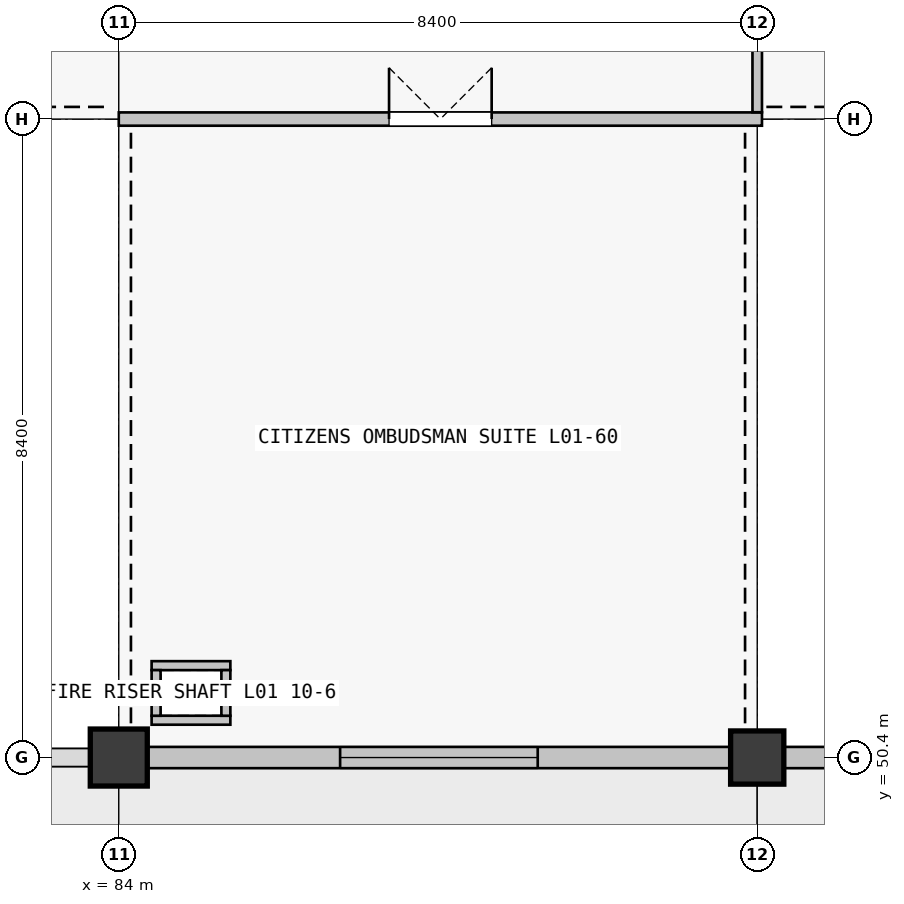
"""IFC4 building model, lengths in metres.
Left out: names, types, materials, properties, quantities, classifications, styles, units other than length and angle.
Written with IfcOpenShell. Run it as: python <this file> out.ifc"""

import sys

from ifc_helpers import new_model, si_unit, direction, frame, frame_2d, origin, origin_2d, place, context, subcontext, project, spatial, rectangle, extrude, element, fill, save


model = new_model("IFC4")
c1 = context("Model", 3, precision=1e-05, world=origin(), true_north=direction((0.0, 1.0)))
c2 = subcontext(c1, "Body", "Model", "MODEL_VIEW")
j1 = project(units=[si_unit("LENGTHUNIT", "METRE"), si_unit("PLANEANGLEUNIT", "RADIAN")], contexts=[c1])
p1 = place(None, origin())
s1 = spatial("IfcSite", under=j1, at=p1, CompositionType="ELEMENT")
p2 = place(p1, origin())
s2 = spatial("IfcBuilding", under=s1, at=p2, CompositionType="ELEMENT")
p3 = place(p2, frame((0.0, 0.0, 5.76)))
s3 = spatial("IfcBuildingStorey", under=s2, at=p3, CompositionType="ELEMENT", Elevation=5.76)
p4 = place(p3, frame((84.0, 50.4, 0.0), z_axis=(0.0, 0.0, 1.0), x_axis=(1.0, 0.0, 0.0)))
e1 = element("IfcColumn", 1, at=p4, inside=s3, PredefinedType="COLUMN", context=c2, shape_type="SweptSolid", body=[
    extrude(rectangle(XDim=0.75, YDim=0.75, at=origin_2d()), origin(), (0.0, 0.0, 1.0), 4.5),
])
p5 = place(p3, frame((92.4, 50.4, 0.0), z_axis=(0.0, 0.0, 1.0), x_axis=(1.0, 0.0, 0.0)))
e2 = element("IfcColumn", 2, at=p5, inside=s3, PredefinedType="COLUMN", context=c2, shape_type="SweptSolid", body=[
    extrude(rectangle(XDim=0.7, YDim=0.7, at=origin_2d()), origin(), (0.0, 0.0, 1.0), 4.5),
])
p6 = place(p3, frame((92.049, 50.4, 0.0), z_axis=(0.0, 0.0, 1.0), x_axis=(-1.0, 0.0, 0.0)))
e3 = element("IfcWall", 3, at=p6, inside=s3, PredefinedType="SOLIDWALL", context=c2, shape_type="SweptSolid", body=[
    extrude(rectangle(XDim=7.673, YDim=0.28, at=frame_2d((3.836, 0.0))), origin(), (0.0, 0.0, 1.0), 3.4),
])
p7 = place(p6, frame((2.537, 0.0, 0.9)))
e4 = element("IfcOpeningElement", 4, at=p7, cuts=e3, PredefinedType="OPENING", context=c2, shape_type="SweptSolid", body=[
    extrude(rectangle(XDim=2.6, YDim=2.1, at=frame_2d((1.3, 1.05))), frame((0.0, 0.14, 0.0), z_axis=(0.0, -1.0, 0.0), x_axis=(1.0, 0.0, 0.0)), (0.0, 0.0, 1.0), 0.28),
])
p8 = place(p3, frame((100.424, 50.4, 0.0), z_axis=(0.0, 0.0, 1.0), x_axis=(-1.0, 0.0, 0.0)))
e5 = element("IfcWall", 5, at=p8, inside=s3, PredefinedType="SOLIDWALL", context=c2, shape_type="SweptSolid", body=[
    extrude(rectangle(XDim=7.673, YDim=0.28, at=frame_2d((3.836, 0.0))), origin(), (0.0, 0.0, 1.0), 3.4),
])
p9 = place(p8, frame((2.736, 0.0, 0.9)))
e6 = element("IfcOpeningElement", 6, at=p9, cuts=e5, PredefinedType="OPENING", context=c2, shape_type="SweptSolid", body=[
    extrude(rectangle(XDim=2.2, YDim=1.75, at=frame_2d((1.1, 0.875))), frame((0.0, 0.14, 0.0), z_axis=(0.0, -1.0, 0.0), x_axis=(1.0, 0.0, 0.0)), (0.0, 0.0, 1.0), 0.28),
])
for number, where, z_axis, x_axis in (
    (7, (84.432, 50.891, 0.0), (0.0, 0.0, 1.0), (1.0, 0.0, 0.0)),
    (8, (84.432, 51.609, 0.0), (0.0, 0.0, 1.0), (1.0, 0.0, 0.0)),
):
    element("IfcWall", number, at=place(p3, frame(where, z_axis=z_axis, x_axis=x_axis)), inside=s3, PredefinedType="PARTITIONING", context=c2, shape_type="SweptSolid", body=[
        extrude(rectangle(XDim=1.036, YDim=0.118, at=frame_2d((0.518, 0.0))), origin(), (0.0, 0.0, 1.0), 3.48),
    ])
p10 = place(p3, frame((84.491, 50.95, 0.0), z_axis=(0.0, 0.0, 1.0), x_axis=(0.0, 1.0, 0.0)))
e9 = element("IfcWall", 9, at=p10, inside=s3, PredefinedType="PARTITIONING", context=c2, shape_type="SweptSolid", body=[
    extrude(rectangle(XDim=0.6, YDim=0.118, at=frame_2d((0.3, 0.0))), origin(), (0.0, 0.0, 1.0), 2.4),
])
p11 = place(p3, frame((85.409, 50.95, 0.0), z_axis=(0.0, 0.0, 1.0), x_axis=(0.0, 1.0, 0.0)))
e10 = element("IfcWall", 10, at=p11, inside=s3, PredefinedType="PARTITIONING", context=c2, shape_type="SweptSolid", body=[
    extrude(rectangle(XDim=0.6, YDim=0.118, at=frame_2d((0.3, 0.0))), origin(), (0.0, 0.0, 1.0), 3.48),
])
p12 = place(p3, frame((84.0, 58.8, 0.0), z_axis=(0.0, 0.0, 1.0), x_axis=(1.0, 0.0, 0.0)))
e11 = element("IfcWall", 11, at=p12, inside=s3, PredefinedType="PARTITIONING", context=c2, shape_type="SweptSolid", body=[
    extrude(rectangle(XDim=8.462, YDim=0.175, at=frame_2d((4.231, 0.0))), origin(), (0.0, 0.0, 1.0), 2.4),
])
p13 = place(p12, frame((3.556, 0.0, 0.0)))
e12 = element("IfcOpeningElement", 12, at=p13, cuts=e11, PredefinedType="OPENING", context=c2, shape_type="SweptSolid", body=[
    extrude(rectangle(XDim=1.35, YDim=2.2, at=frame_2d((0.675, 1.1))), frame((0.0, 0.087, 0.0), z_axis=(0.0, -1.0, 0.0), x_axis=(1.0, 0.0, 0.0)), (0.0, 0.0, 1.0), 0.175),
])
p14 = place(p3, frame((92.4, 58.889, 0.0), z_axis=(0.0, 0.0, 1.0), x_axis=(0.0, 1.0, 0.0)))
e13 = element("IfcWall", 13, at=p14, inside=s3, PredefinedType="PARTITIONING", context=c2, shape_type="SweptSolid", body=[
    extrude(rectangle(XDim=7.958, YDim=0.125, at=frame_2d((3.979, 0.0))), origin(), (0.0, 0.0, 1.0), 2.4),
])
p15 = place(p14, frame((3.279, 0.0, 0.0)))
e14 = element("IfcOpeningElement", 14, at=p15, cuts=e13, PredefinedType="OPENING", context=c2, shape_type="SweptSolid", body=[
    extrude(rectangle(XDim=1.4, YDim=2.22, at=frame_2d((0.7, 1.11))), frame((0.0, 0.062, 0.0), z_axis=(0.0, -1.0, 0.0), x_axis=(1.0, 0.0, 0.0)), (0.0, 0.0, 1.0), 0.125),
])
p16 = place(p7, origin())
e15 = element("IfcWindow", 15, at=p16, inside=s3, PartitioningType="SINGLE_PANEL", PredefinedType="WINDOW", context=c2, shape_type="SweptSolid", body=[
    extrude(rectangle(XDim=2.6, YDim=2.1, at=frame_2d((1.3, 1.05))), frame((0.0, 0.03, 0.0), z_axis=(0.0, -1.0, 0.0), x_axis=(1.0, 0.0, 0.0)), (0.0, 0.0, 1.0), 0.06),
])
fill(e4, e15)
p17 = place(p13, origin())
e16 = element("IfcDoor", 16, at=p17, inside=s3, OperationType="DOUBLE_DOOR_SINGLE_SWING", PredefinedType="DOOR", context=c2, shape_type="SweptSolid", body=[
    extrude(rectangle(XDim=1.35, YDim=2.2, at=frame_2d((0.675, 1.1))), frame((0.0, 0.025, 0.0), z_axis=(0.0, -1.0, 0.0), x_axis=(1.0, 0.0, 0.0)), (0.0, 0.0, 1.0), 0.05),
])
fill(e12, e16)
save(model, sys.argv[1])
